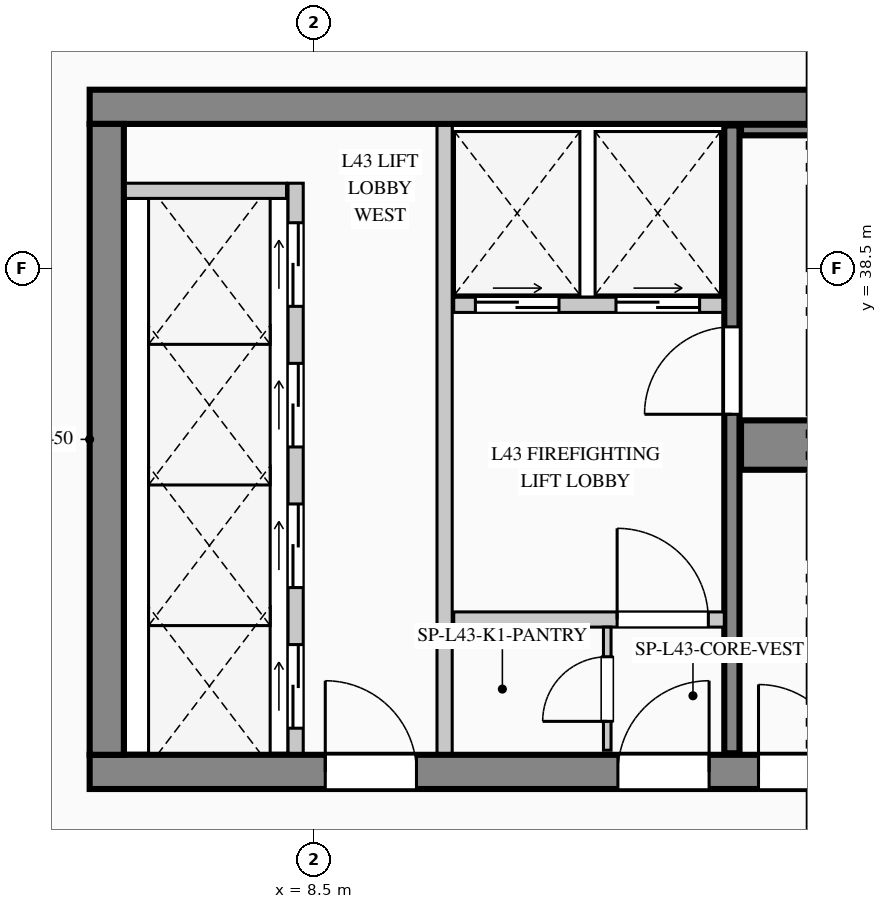
"""IFC4 building model, lengths in metres.
Left out: names, types, materials, properties, quantities, classifications, styles, units other than length and angle.
Written with IfcOpenShell. Run it as: python <this file> out.ifc"""

import sys

from ifc_helpers import new_model, si_unit, direction, frame, frame_2d, origin, place, context, subcontext, project, spatial, rectangle, extrude, element, fill, save


model = new_model("IFC4")
c1 = context("Model", 3, precision=1e-05, world=origin(), true_north=direction((0.0, 1.0)))
c2 = subcontext(c1, "Body", "Model", "MODEL_VIEW")
j1 = project(units=[si_unit("LENGTHUNIT", "METRE"), si_unit("PLANEANGLEUNIT", "RADIAN")], contexts=[c1])
p1 = place(None, origin())
s1 = spatial("IfcSite", under=j1, at=p1, CompositionType="ELEMENT")
p2 = place(p1, origin())
s2 = spatial("IfcBuilding", under=s1, at=p2, CompositionType="ELEMENT")
p3 = place(p2, frame((0.0, 0.0, 183.75)))
s3 = spatial("IfcBuildingStorey", under=s2, at=p3, CompositionType="ELEMENT", Elevation=183.75)
p4 = place(p3, frame((5.55, 40.625, 0.0), z_axis=(0.0, 0.0, 1.0), x_axis=(1.0, 0.0, 0.0)))
e1 = element("IfcWall", 1, at=p4, inside=s3, PredefinedType="SHEAR", context=c2, shape_type="SweptSolid", body=[
    extrude(rectangle(XDim=17.75, YDim=0.45, at=frame_2d((8.875, 0.0))), origin(), (0.0, 0.0, 1.0), 3.95),
])
p5 = place(p4, frame((15.895, 0.0, 0.0)))
e2 = element("IfcOpeningElement", 2, at=p5, cuts=e1, PredefinedType="OPENING", context=c2, shape_type="SweptSolid", body=[
    extrude(rectangle(XDim=1.18, YDim=2.25, at=frame_2d((0.59, 1.125))), frame((0.0, 0.235, 0.0), z_axis=(0.0, -1.0, 0.0), x_axis=(1.0, 0.0, 0.0)), (0.0, 0.0, 1.0), 0.47),
])
p6 = place(p3, frame((5.55, 31.875, 0.0), z_axis=(0.0, 0.0, 1.0), x_axis=(1.0, 0.0, 0.0)))
e3 = element("IfcWall", 3, at=p6, inside=s3, PredefinedType="SHEAR", context=c2, shape_type="SweptSolid", body=[
    extrude(rectangle(XDim=17.75, YDim=0.45, at=frame_2d((8.875, 0.0))), origin(), (0.0, 0.0, 1.0), 3.95),
])
p7 = place(p6, frame((3.1, 0.0, 0.0)))
e4 = element("IfcOpeningElement", 4, at=p7, cuts=e3, PredefinedType="OPENING", context=c2, shape_type="SweptSolid", body=[
    extrude(rectangle(XDim=1.2, YDim=2.2, at=frame_2d((0.6, 1.1))), frame((0.0, 0.235, 0.0), z_axis=(0.0, -1.0, 0.0), x_axis=(1.0, 0.0, 0.0)), (0.0, 0.0, 1.0), 0.47),
])
p8 = place(p6, frame((6.95, 0.0, 0.0)))
e5 = element("IfcOpeningElement", 5, at=p8, cuts=e3, PredefinedType="OPENING", context=c2, shape_type="SweptSolid", body=[
    extrude(rectangle(XDim=1.2, YDim=2.2, at=frame_2d((0.6, 1.1))), frame((0.0, 0.235, 0.0), z_axis=(0.0, -1.0, 0.0), x_axis=(1.0, 0.0, 0.0)), (0.0, 0.0, 1.0), 0.47),
])
p9 = place(p6, frame((8.8, 0.0, 0.0)))
e6 = element("IfcOpeningElement", 6, at=p9, cuts=e3, PredefinedType="OPENING", context=c2, shape_type="SweptSolid", body=[
    extrude(rectangle(XDim=1.15, YDim=2.2, at=frame_2d((0.575, 1.1))), frame((0.0, 0.235, 0.0), z_axis=(0.0, -1.0, 0.0), x_axis=(1.0, 0.0, 0.0)), (0.0, 0.0, 1.0), 0.47),
])
p10 = place(p6, frame((15.9, 0.0, 0.0)))
e7 = element("IfcOpeningElement", 7, at=p10, cuts=e3, PredefinedType="OPENING", context=c2, shape_type="SweptSolid", body=[
    extrude(rectangle(XDim=1.2, YDim=2.2, at=frame_2d((0.6, 1.1))), frame((0.0, 0.235, 0.0), z_axis=(0.0, -1.0, 0.0), x_axis=(1.0, 0.0, 0.0)), (0.0, 0.0, 1.0), 0.47),
])
p11 = place(p3, frame((5.775, 32.1, 0.0), z_axis=(0.0, 0.0, 1.0), x_axis=(0.0, 1.0, 0.0)))
e8 = element("IfcWall", 8, at=p11, inside=s3, PredefinedType="SHEAR", context=c2, shape_type="SweptSolid", body=[
    extrude(rectangle(XDim=8.3, YDim=0.45, at=frame_2d((4.15, 0.0))), origin(), (0.0, 0.0, 1.0), 3.95),
])
p12 = place(p3, frame((14.0, 32.12, 0.0), z_axis=(0.0, 0.0, 1.0), x_axis=(0.0, 1.0, 0.0)))
e9 = element("IfcWall", 9, at=p12, inside=s3, PredefinedType="SHEAR", context=c2, shape_type="SweptSolid", body=[
    extrude(rectangle(XDim=8.26, YDim=0.2, at=frame_2d((4.13, 0.0))), origin(), (0.0, 0.0, 1.0), 3.95),
])
p13 = place(p12, frame((4.46, 0.0, 0.0)))
e10 = element("IfcOpeningElement", 10, at=p13, cuts=e9, PredefinedType="OPENING", context=c2, shape_type="SweptSolid", body=[
    extrude(rectangle(XDim=1.15, YDim=2.2, at=frame_2d((0.575, 1.1))), frame((0.0, 0.11, 0.0), z_axis=(0.0, -1.0, 0.0), x_axis=(1.0, 0.0, 0.0)), (0.0, 0.0, 1.0), 0.22),
])
p14 = place(p3, frame((14.12, 36.175, 0.0), z_axis=(0.0, 0.0, 1.0), x_axis=(1.0, 0.0, 0.0)))
e11 = element("IfcWall", 11, at=p14, inside=s3, PredefinedType="SHEAR", context=c2, shape_type="SweptSolid", body=[
    extrude(rectangle(XDim=7.01, YDim=0.65, at=frame_2d((3.505, 0.0))), origin(), (0.0, 0.0, 1.0), 3.95),
])
p15 = place(p3, frame((14.12, 40.32, 0.0), z_axis=(0.0, 0.0, 1.0), x_axis=(1.0, 0.0, 0.0)))
e12 = element("IfcWall", 12, at=p15, inside=s3, PredefinedType="SHEAR", context=c2, shape_type="SweptSolid", body=[
    extrude(rectangle(XDim=7.01, YDim=0.14, at=frame_2d((3.505, 0.0))), origin(), (0.0, 0.0, 1.0), 3.95),
])
p16 = place(p3, frame((7.469, 4.63, 0.0), z_axis=(0.0, 0.0, 1.0), x_axis=(-0.123515300309, 0.992342667928, 0.0)))
e13 = element("IfcWall", 13, at=p16, inside=s3, PredefinedType="STANDARD", context=c2, shape_type="SweptSolid", body=[
    extrude(rectangle(XDim=37.024, YDim=0.26, at=frame_2d((18.512, 0.0))), origin(), (0.0, 0.0, 1.0), 3.7),
])
p17 = place(p16, frame((11.978, 0.0, 0.9)))
e14 = element("IfcOpeningElement", 14, at=p17, cuts=e13, PredefinedType="OPENING", context=c2, shape_type="SweptSolid", body=[
    extrude(rectangle(XDim=2.7, YDim=2.1, at=frame_2d((1.35, 1.05))), frame((0.0, 0.14, 0.0), z_axis=(0.0, -1.0, 0.0), x_axis=(1.0, 0.0, 0.0)), (0.0, 0.0, 1.0), 0.28),
])
p18 = place(p3, frame((8.26, 32.12, 0.0), z_axis=(0.0, 0.0, 1.0), x_axis=(0.0, 1.0, 0.0)))
e15 = element("IfcWall", 15, at=p18, inside=s3, PredefinedType="PARTITIONING", context=c2, shape_type="SweptSolid", body=[
    extrude(rectangle(XDim=7.5, YDim=0.2, at=frame_2d((3.75, 0.0))), origin(), (0.0, 0.0, 1.0), 3.7),
])
p19 = place(p18, frame((0.33, 0.0, 0.0)))
e16 = element("IfcOpeningElement", 16, at=p19, cuts=e15, PredefinedType="OPENING", context=c2, shape_type="SweptSolid", body=[
    extrude(rectangle(XDim=1.1, YDim=2.2, at=frame_2d((0.55, 1.1))), frame((0.0, 0.11, 0.0), z_axis=(0.0, -1.0, 0.0), x_axis=(1.0, 0.0, 0.0)), (0.0, 0.0, 1.0), 0.22),
])
p20 = place(p18, frame((2.18, 0.0, 0.0)))
e17 = element("IfcOpeningElement", 17, at=p20, cuts=e15, PredefinedType="OPENING", context=c2, shape_type="SweptSolid", body=[
    extrude(rectangle(XDim=1.1, YDim=2.2, at=frame_2d((0.55, 1.1))), frame((0.0, 0.11, 0.0), z_axis=(0.0, -1.0, 0.0), x_axis=(1.0, 0.0, 0.0)), (0.0, 0.0, 1.0), 0.22),
])
p21 = place(p18, frame((4.03, 0.0, 0.0)))
e18 = element("IfcOpeningElement", 18, at=p21, cuts=e15, PredefinedType="OPENING", context=c2, shape_type="SweptSolid", body=[
    extrude(rectangle(XDim=1.1, YDim=2.2, at=frame_2d((0.55, 1.1))), frame((0.0, 0.11, 0.0), z_axis=(0.0, -1.0, 0.0), x_axis=(1.0, 0.0, 0.0)), (0.0, 0.0, 1.0), 0.22),
])
p22 = place(p18, frame((5.88, 0.0, 0.0)))
e19 = element("IfcOpeningElement", 19, at=p22, cuts=e15, PredefinedType="OPENING", context=c2, shape_type="SweptSolid", body=[
    extrude(rectangle(XDim=1.1, YDim=2.2, at=frame_2d((0.55, 1.1))), frame((0.0, 0.11, 0.0), z_axis=(0.0, -1.0, 0.0), x_axis=(1.0, 0.0, 0.0)), (0.0, 0.0, 1.0), 0.22),
])
p23 = place(p3, frame((6.02, 39.52, 0.0), z_axis=(0.0, 0.0, 1.0), x_axis=(1.0, 0.0, 0.0)))
e20 = element("IfcWall", 20, at=p23, inside=s3, PredefinedType="PARTITIONING", context=c2, shape_type="SweptSolid", body=[
    extrude(rectangle(XDim=2.12, YDim=0.2, at=frame_2d((1.06, 0.0))), origin(), (0.0, 0.0, 1.0), 3.7),
])
p24 = place(p3, frame((10.22, 32.12, 0.0), z_axis=(0.0, 0.0, 1.0), x_axis=(0.0, 1.0, 0.0)))
e21 = element("IfcWall", 21, at=p24, inside=s3, PredefinedType="PARTITIONING", context=c2, shape_type="SweptSolid", body=[
    extrude(rectangle(XDim=8.26, YDim=0.2, at=frame_2d((4.13, 0.0))), origin(), (0.0, 0.0, 1.0), 3.7),
])
p25 = place(p3, frame((10.34, 38.02, 0.0), z_axis=(0.0, 0.0, 1.0), x_axis=(1.0, 0.0, 0.0)))
e22 = element("IfcWall", 22, at=p25, inside=s3, PredefinedType="PARTITIONING", context=c2, shape_type="SweptSolid", body=[
    extrude(rectangle(XDim=3.54, YDim=0.2, at=frame_2d((1.77, 0.0))), origin(), (0.0, 0.0, 1.0), 3.7),
])
p26 = place(p25, frame((0.285, 0.0, 0.0)))
e23 = element("IfcOpeningElement", 23, at=p26, cuts=e22, PredefinedType="OPENING", context=c2, shape_type="SweptSolid", body=[
    extrude(rectangle(XDim=1.1, YDim=2.2, at=frame_2d((0.55, 1.1))), frame((0.0, 0.11, 0.0), z_axis=(0.0, -1.0, 0.0), x_axis=(1.0, 0.0, 0.0)), (0.0, 0.0, 1.0), 0.22),
])
p27 = place(p25, frame((2.135, 0.0, 0.0)))
e24 = element("IfcOpeningElement", 24, at=p27, cuts=e22, PredefinedType="OPENING", context=c2, shape_type="SweptSolid", body=[
    extrude(rectangle(XDim=1.1, YDim=2.2, at=frame_2d((0.55, 1.1))), frame((0.0, 0.11, 0.0), z_axis=(0.0, -1.0, 0.0), x_axis=(1.0, 0.0, 0.0)), (0.0, 0.0, 1.0), 0.22),
])
p28 = place(p3, frame((10.34, 33.88, 0.0), z_axis=(0.0, 0.0, 1.0), x_axis=(1.0, 0.0, 0.0)))
e25 = element("IfcWall", 25, at=p28, inside=s3, PredefinedType="PARTITIONING", context=c2, shape_type="SweptSolid", body=[
    extrude(rectangle(XDim=3.56, YDim=0.2, at=frame_2d((1.78, 0.0))), origin(), (0.0, 0.0, 1.0), 3.7),
])
p29 = place(p28, frame((2.15, 0.0, 0.0)))
e26 = element("IfcOpeningElement", 26, at=p29, cuts=e25, PredefinedType="OPENING", context=c2, shape_type="SweptSolid", body=[
    extrude(rectangle(XDim=1.2, YDim=2.2, at=frame_2d((0.6, 1.1))), frame((0.0, 0.11, 0.0), z_axis=(0.0, -1.0, 0.0), x_axis=(1.0, 0.0, 0.0)), (0.0, 0.0, 1.0), 0.22),
])
p30 = place(p3, frame((12.36, 32.16, 0.0), z_axis=(0.0, 0.0, 1.0), x_axis=(0.0, 1.0, 0.0)))
e27 = element("IfcWall", 27, at=p30, inside=s3, PredefinedType="PARTITIONING", context=c2, shape_type="SweptSolid", body=[
    extrude(rectangle(XDim=1.62, YDim=0.1, at=frame_2d((0.81, 0.0))), origin(), (0.0, 0.0, 1.0), 3.7),
])
p31 = place(p30, frame((0.38, 0.0, 0.0)))
e28 = element("IfcOpeningElement", 28, at=p31, cuts=e27, PredefinedType="OPENING", context=c2, shape_type="SweptSolid", body=[
    extrude(rectangle(XDim=0.85, YDim=2.1, at=frame_2d((0.425, 1.05))), frame((0.0, 0.06, 0.0), z_axis=(0.0, -1.0, 0.0), x_axis=(1.0, 0.0, 0.0)), (0.0, 0.0, 1.0), 0.12),
])
p32 = place(p7, origin())
e29 = element("IfcDoor", 29, at=p32, inside=s3, OperationType="SINGLE_SWING_LEFT", PredefinedType="DOOR", context=c2, shape_type="SweptSolid", body=[
    extrude(rectangle(XDim=1.2, YDim=2.2, at=frame_2d((0.6, 1.1))), frame((0.0, 0.025, 0.0), z_axis=(0.0, -1.0, 0.0), x_axis=(1.0, 0.0, 0.0)), (0.0, 0.0, 1.0), 0.05),
])
fill(e4, e29)
p33 = place(p8, origin())
e30 = element("IfcDoor", 30, at=p33, inside=s3, OperationType="SINGLE_SWING_RIGHT", PredefinedType="DOOR", context=c2, shape_type="SweptSolid", body=[
    extrude(rectangle(XDim=1.2, YDim=2.2, at=frame_2d((0.6, 1.1))), frame((0.0, 0.025, 0.0), z_axis=(0.0, -1.0, 0.0), x_axis=(1.0, 0.0, 0.0)), (0.0, 0.0, 1.0), 0.05),
])
fill(e5, e30)
p34 = place(p9, origin())
e31 = element("IfcDoor", 31, at=p34, inside=s3, OperationType="SINGLE_SWING_LEFT", PredefinedType="DOOR", context=c2, shape_type="SweptSolid", body=[
    extrude(rectangle(XDim=1.15, YDim=2.2, at=frame_2d((0.575, 1.1))), frame((0.0, 0.025, 0.0), z_axis=(0.0, -1.0, 0.0), x_axis=(1.0, 0.0, 0.0)), (0.0, 0.0, 1.0), 0.05),
])
fill(e6, e31)
p35 = place(p29, origin())
e32 = element("IfcDoor", 32, at=p35, inside=s3, OperationType="SINGLE_SWING_LEFT", PredefinedType="DOOR", context=c2, shape_type="SweptSolid", body=[
    extrude(rectangle(XDim=1.2, YDim=2.2, at=frame_2d((0.6, 1.1))), frame((0.0, 0.025, 0.0), z_axis=(0.0, -1.0, 0.0), x_axis=(1.0, 0.0, 0.0)), (0.0, 0.0, 1.0), 0.05),
])
fill(e26, e32)
p36 = place(p31, origin())
e33 = element("IfcDoor", 33, at=p36, inside=s3, OperationType="SINGLE_SWING_LEFT", PredefinedType="DOOR", context=c2, shape_type="SweptSolid", body=[
    extrude(rectangle(XDim=0.85, YDim=2.1, at=frame_2d((0.425, 1.05))), frame((0.0, 0.025, 0.0), z_axis=(0.0, -1.0, 0.0), x_axis=(1.0, 0.0, 0.0)), (0.0, 0.0, 1.0), 0.05),
])
fill(e28, e33)
p37 = place(p13, origin())
e34 = element("IfcDoor", 34, at=p37, inside=s3, OperationType="SINGLE_SWING_LEFT", PredefinedType="DOOR", context=c2, shape_type="SweptSolid", body=[
    extrude(rectangle(XDim=1.15, YDim=2.2, at=frame_2d((0.575, 1.1))), frame((0.0, 0.025, 0.0), z_axis=(0.0, -1.0, 0.0), x_axis=(1.0, 0.0, 0.0)), (0.0, 0.0, 1.0), 0.05),
])
fill(e10, e34)
p38 = place(p19, origin())
e35 = element("IfcDoor", 35, at=p38, inside=s3, OperationType="DOUBLE_DOOR_SLIDING", PredefinedType="DOOR", context=c2, shape_type="SweptSolid", body=[
    extrude(rectangle(XDim=1.1, YDim=2.2, at=frame_2d((0.55, 1.1))), frame((0.0, 0.025, 0.0), z_axis=(0.0, -1.0, 0.0), x_axis=(1.0, 0.0, 0.0)), (0.0, 0.0, 1.0), 0.05),
])
fill(e16, e35)
p39 = place(p20, origin())
e36 = element("IfcDoor", 36, at=p39, inside=s3, OperationType="DOUBLE_DOOR_SLIDING", PredefinedType="DOOR", context=c2, shape_type="SweptSolid", body=[
    extrude(rectangle(XDim=1.1, YDim=2.2, at=frame_2d((0.55, 1.1))), frame((0.0, 0.025, 0.0), z_axis=(0.0, -1.0, 0.0), x_axis=(1.0, 0.0, 0.0)), (0.0, 0.0, 1.0), 0.05),
])
fill(e17, e36)
p40 = place(p21, origin())
e37 = element("IfcDoor", 37, at=p40, inside=s3, OperationType="DOUBLE_DOOR_SLIDING", PredefinedType="DOOR", context=c2, shape_type="SweptSolid", body=[
    extrude(rectangle(XDim=1.1, YDim=2.2, at=frame_2d((0.55, 1.1))), frame((0.0, 0.025, 0.0), z_axis=(0.0, -1.0, 0.0), x_axis=(1.0, 0.0, 0.0)), (0.0, 0.0, 1.0), 0.05),
])
fill(e18, e37)
p41 = place(p22, origin())
e38 = element("IfcDoor", 38, at=p41, inside=s3, OperationType="DOUBLE_DOOR_SLIDING", PredefinedType="DOOR", context=c2, shape_type="SweptSolid", body=[
    extrude(rectangle(XDim=1.1, YDim=2.2, at=frame_2d((0.55, 1.1))), frame((0.0, 0.025, 0.0), z_axis=(0.0, -1.0, 0.0), x_axis=(1.0, 0.0, 0.0)), (0.0, 0.0, 1.0), 0.05),
])
fill(e19, e38)
p42 = place(p26, origin())
e39 = element("IfcDoor", 39, at=p42, inside=s3, OperationType="DOUBLE_DOOR_SLIDING", PredefinedType="DOOR", context=c2, shape_type="SweptSolid", body=[
    extrude(rectangle(XDim=1.1, YDim=2.2, at=frame_2d((0.55, 1.1))), frame((0.0, 0.025, 0.0), z_axis=(0.0, -1.0, 0.0), x_axis=(1.0, 0.0, 0.0)), (0.0, 0.0, 1.0), 0.05),
])
fill(e23, e39)
p43 = place(p27, origin())
e40 = element("IfcDoor", 40, at=p43, inside=s3, OperationType="DOUBLE_DOOR_SLIDING", PredefinedType="DOOR", context=c2, shape_type="SweptSolid", body=[
    extrude(rectangle(XDim=1.1, YDim=2.2, at=frame_2d((0.55, 1.1))), frame((0.0, 0.025, 0.0), z_axis=(0.0, -1.0, 0.0), x_axis=(1.0, 0.0, 0.0)), (0.0, 0.0, 1.0), 0.05),
])
fill(e24, e40)
save(model, sys.argv[1])
